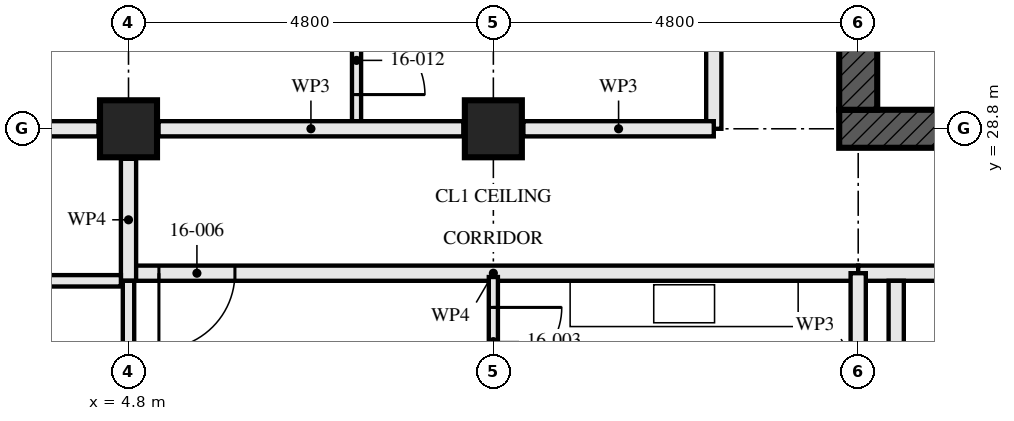
"""IFC4 building model, lengths in metres.
Left out: names, types, materials, properties, quantities, classifications, styles, units other than length and angle.
Written with IfcOpenShell. Run it as: python <this file> out.ifc"""

import sys

from ifc_helpers import new_model, si_unit, direction, frame, frame_2d, origin, origin_2d, place, context, subcontext, project, spatial, rectangle, hollow_rectangle, extrude, element, fill, save


model = new_model("IFC4")
c1 = context("Model", 3, precision=1e-05, world=origin(), true_north=direction((0.0, 1.0)))
c2 = subcontext(c1, "Body", "Model", "MODEL_VIEW")
j1 = project(units=[si_unit("LENGTHUNIT", "METRE"), si_unit("PLANEANGLEUNIT", "RADIAN")], contexts=[c1])
p1 = place(None, origin())
s1 = spatial("IfcSite", under=j1, at=p1, CompositionType="ELEMENT")
p2 = place(p1, origin())
s2 = spatial("IfcBuilding", under=s1, at=p2, CompositionType="ELEMENT")
p3 = place(p2, frame((0.0, 0.0, 62.0)))
s3 = spatial("IfcBuildingStorey", under=s2, at=p3, CompositionType="ELEMENT", Elevation=62.0)
for number, where, z_axis, x_axis in (
    (1, (4.8, 28.8, 0.0), (0.0, 0.0, 1.0), (0.0, 1.0, 0.0)),
    (2, (9.6, 28.8, 0.0), (0.0, 0.0, 1.0), (0.0, 1.0, 0.0)),
):
    element("IfcColumn", number, at=place(p3, frame(where, z_axis=z_axis, x_axis=x_axis)), inside=s3, PredefinedType="COLUMN", context=c2, shape_type="SweptSolid", body=[
        extrude(hollow_rectangle(XDim=0.75, YDim=0.75, WallThickness=0.08, at=origin_2d()), origin(), (0.0, 0.0, 1.0), 3.5),
    ])
p4 = place(p3, frame((14.15, 28.8, -0.17), z_axis=(0.0, 0.0, 1.0), x_axis=(1.0, 0.0, 0.0)))
e3 = element("IfcWall", 3, at=p4, inside=s3, PredefinedType="SHEAR", context=c2, shape_type="SweptSolid", body=[
    extrude(rectangle(XDim=14.9, YDim=0.5, at=frame_2d((7.45, 0.0))), origin(), (0.0, 0.0, 1.0), 3.5),
])
p5 = place(p4, frame((6.85, 0.0, 0.17)))
e4 = element("IfcOpeningElement", 4, at=p5, cuts=e3, PredefinedType="OPENING", context=c2, shape_type="SweptSolid", body=[
    extrude(rectangle(XDim=1.2, YDim=2.1, at=frame_2d((0.6, 1.05))), frame((0.0, 0.26, 0.0), z_axis=(0.0, -1.0, 0.0), x_axis=(1.0, 0.0, 0.0)), (0.0, 0.0, 1.0), 0.521),
])
p6 = place(p3, frame((14.4, 42.95, -0.17), z_axis=(0.0, 0.0, 1.0), x_axis=(0.0, -1.0, 0.0)))
e5 = element("IfcWall", 5, at=p6, inside=s3, PredefinedType="SHEAR", context=c2, shape_type="SweptSolid", body=[
    extrude(rectangle(XDim=13.9, YDim=0.5, at=frame_2d((6.95, 0.0))), origin(), (0.0, 0.0, 1.0), 3.5),
])
p7 = place(p6, frame((6.35, 0.0, 0.17)))
e6 = element("IfcOpeningElement", 6, at=p7, cuts=e5, PredefinedType="OPENING", context=c2, shape_type="SweptSolid", body=[
    extrude(rectangle(XDim=1.2, YDim=2.1, at=frame_2d((0.6, 1.05))), frame((0.0, 0.26, 0.0), z_axis=(0.0, -1.0, 0.0), x_axis=(1.0, 0.0, 0.0)), (0.0, 0.0, 1.0), 0.521),
])
p8 = place(p3, frame((4.8, 23.8, 0.0), z_axis=(0.0, 0.0, 1.0), x_axis=(0.0, 1.0, 0.0)))
e7 = element("IfcWall", 7, at=p8, inside=s3, PredefinedType="PARTITIONING", context=c2, shape_type="SweptSolid", body=[
    extrude(rectangle(XDim=3.0, YDim=0.15, at=frame_2d((1.5, 0.0))), origin(), (0.0, 0.0, 1.0), 2.55),
])
p9 = place(p8, frame((1.05, 0.0, 0.0)))
e8 = element("IfcOpeningElement", 8, at=p9, cuts=e7, PredefinedType="OPENING", context=c2, shape_type="SweptSolid", body=[
    extrude(rectangle(XDim=0.9, YDim=2.1, at=frame_2d((0.45, 1.05))), frame((0.0, 0.085, 0.0), z_axis=(0.0, -1.0, 0.0), x_axis=(1.0, 0.0, 0.0)), (0.0, 0.0, 1.0), 0.171),
])
p10 = place(p3, frame((9.6, 22.2, 0.0), z_axis=(0.0, 0.0, 1.0), x_axis=(0.0, 1.0, 0.0)))
e9 = element("IfcWall", 9, at=p10, inside=s3, PredefinedType="PARTITIONING", context=c2, shape_type="SweptSolid", body=[
    extrude(rectangle(XDim=4.65, YDim=0.12, at=frame_2d((2.325, 0.0))), origin(), (0.0, 0.0, 1.0), 2.55),
])
p11 = place(p10, frame((3.35, 0.0, 0.0)))
e10 = element("IfcOpeningElement", 10, at=p11, cuts=e9, PredefinedType="OPENING", context=c2, shape_type="SweptSolid", body=[
    extrude(rectangle(XDim=0.9, YDim=2.1, at=frame_2d((0.45, 1.05))), frame((0.0, 0.071, 0.0), z_axis=(0.0, -1.0, 0.0), x_axis=(1.0, 0.0, 0.0)), (0.0, 0.0, 1.0), 0.141),
])
p12 = place(p3, frame((4.8, 26.9, 0.0), z_axis=(0.0, 0.0, 1.0), x_axis=(1.0, 0.0, 0.0)))
e11 = element("IfcWall", 11, at=p12, inside=s3, PredefinedType="PARTITIONING", context=c2, shape_type="SweptSolid", body=[
    extrude(rectangle(XDim=9.6, YDim=0.2, at=frame_2d((4.8, 0.0))), origin(), (0.0, 0.0, 1.0), 3.33),
])
p13 = place(p12, frame((0.4, 0.0, 0.0)))
e12 = element("IfcOpeningElement", 12, at=p13, cuts=e11, PredefinedType="OPENING", context=c2, shape_type="SweptSolid", body=[
    extrude(rectangle(XDim=1.0, YDim=2.1, at=frame_2d((0.5, 1.05))), frame((0.0, 0.111, 0.0), z_axis=(0.0, -1.0, 0.0), x_axis=(1.0, 0.0, 0.0)), (0.0, 0.0, 1.0), 0.221),
])
p14 = place(p3, frame((4.8, 26.8, 0.0), z_axis=(0.0, 0.0, 1.0), x_axis=(0.0, 1.0, 0.0)))
e13 = element("IfcWall", 13, at=p14, inside=s3, PredefinedType="PARTITIONING", context=c2, shape_type="SweptSolid", body=[
    extrude(rectangle(XDim=1.605, YDim=0.2, at=frame_2d((0.802, 0.0))), origin(), (0.0, 0.0, 1.0), 3.33),
])
p15 = place(p3, frame((7.8, 33.6, 0.0), z_axis=(0.0, 0.0, 1.0), x_axis=(0.0, -1.0, 0.0)))
e14 = element("IfcWall", 14, at=p15, inside=s3, PredefinedType="PARTITIONING", context=c2, shape_type="SweptSolid", body=[
    extrude(rectangle(XDim=4.8, YDim=0.12, at=frame_2d((2.4, 0.0))), origin(), (0.0, 0.0, 1.0), 3.33),
])
p16 = place(p15, frame((3.45, 0.0, 0.0)))
e15 = element("IfcOpeningElement", 15, at=p16, cuts=e14, PredefinedType="OPENING", context=c2, shape_type="SweptSolid", body=[
    extrude(rectangle(XDim=0.9, YDim=2.1, at=frame_2d((0.45, 1.05))), frame((0.0, 0.071, 0.0), z_axis=(0.0, -1.0, 0.0), x_axis=(1.0, 0.0, 0.0)), (0.0, 0.0, 1.0), 0.141),
])
p17 = place(p3, frame((12.5, 43.2, 0.0), z_axis=(0.0, 0.0, 1.0), x_axis=(0.0, -1.0, 0.0)))
e16 = element("IfcWall", 16, at=p17, inside=s3, PredefinedType="PARTITIONING", context=c2, shape_type="SweptSolid", body=[
    extrude(rectangle(XDim=14.4, YDim=0.2, at=frame_2d((7.2, 0.0))), origin(), (0.0, 0.0, 1.0), 2.55),
])
p18 = place(p17, frame((1.4, 0.0, 0.0)))
e17 = element("IfcOpeningElement", 17, at=p18, cuts=e16, PredefinedType="OPENING", context=c2, shape_type="SweptSolid", body=[
    extrude(rectangle(XDim=1.0, YDim=2.1, at=frame_2d((0.5, 1.05))), frame((0.0, 0.111, 0.0), z_axis=(0.0, -1.0, 0.0), x_axis=(1.0, 0.0, 0.0)), (0.0, 0.0, 1.0), 0.221),
])
p19 = place(p17, frame((10.0, 0.0, 0.0)))
e18 = element("IfcOpeningElement", 18, at=p19, cuts=e16, PredefinedType="OPENING", context=c2, shape_type="SweptSolid", body=[
    extrude(rectangle(XDim=1.0, YDim=2.1, at=frame_2d((0.5, 1.05))), frame((0.0, 0.111, 0.0), z_axis=(0.0, -1.0, 0.0), x_axis=(1.0, 0.0, 0.0)), (0.0, 0.0, 1.0), 0.221),
])
p20 = place(p3, frame((14.9, 22.1, 0.0), z_axis=(0.0, 0.0, 1.0), x_axis=(0.0, 1.0, 0.0)))
e19 = element("IfcWall", 19, at=p20, inside=s3, PredefinedType="SOLIDWALL", context=c2, shape_type="SweptSolid", body=[
    extrude(rectangle(XDim=4.7, YDim=0.2, at=frame_2d((2.35, 0.0))), origin(), (0.0, 0.0, 1.0), 2.99),
])
p21 = place(p3, frame((14.4, 26.9, 0.0), z_axis=(0.0, 0.0, 1.0), x_axis=(1.0, 0.0, 0.0)))
e20 = element("IfcWall", 20, at=p21, inside=s3, PredefinedType="SOLIDWALL", context=c2, shape_type="SweptSolid", body=[
    extrude(rectangle(XDim=3.4, YDim=0.2, at=frame_2d((1.7, 0.0))), origin(), (0.0, 0.0, 1.0), 3.33),
])
p22 = place(p21, frame((1.4, 0.0, 0.0)))
e21 = element("IfcOpeningElement", 21, at=p22, cuts=e20, PredefinedType="OPENING", context=c2, shape_type="SweptSolid", body=[
    extrude(rectangle(XDim=1.0, YDim=2.1, at=frame_2d((0.5, 1.05))), frame((0.0, 0.111, 0.0), z_axis=(0.0, -1.0, 0.0), x_axis=(1.0, 0.0, 0.0)), (0.0, 0.0, 1.0), 0.221),
])
p23 = place(p3, frame((12.5, 28.8, 0.0), z_axis=(0.0, 0.0, 1.0), x_axis=(-1.0, 0.0, 0.0)))
e22 = element("IfcWall", 22, at=p23, inside=s3, PredefinedType="PARTITIONING", context=c2, shape_type="SweptSolid", body=[
    extrude(rectangle(XDim=2.505, YDim=0.2, at=frame_2d((1.252, 0.0))), origin(), (0.0, 0.0, 1.0), 2.32),
])
p24 = place(p3, frame((9.205, 28.8, 0.0), z_axis=(0.0, 0.0, 1.0), x_axis=(-1.0, 0.0, 0.0)))
e23 = element("IfcWall", 23, at=p24, inside=s3, PredefinedType="PARTITIONING", context=c2, shape_type="SweptSolid", body=[
    extrude(rectangle(XDim=4.01, YDim=0.2, at=frame_2d((2.005, 0.0))), origin(), (0.0, 0.0, 1.0), 2.32),
])
p25 = place(p3, frame((4.405, 28.8, 0.0), z_axis=(0.0, 0.0, 1.0), x_axis=(-1.0, 0.0, 0.0)))
e24 = element("IfcWall", 24, at=p25, inside=s3, PredefinedType="PARTITIONING", context=c2, shape_type="SweptSolid", body=[
    extrude(rectangle(XDim=4.085, YDim=0.2, at=frame_2d((2.042, 0.0))), origin(), (0.0, 0.0, 1.0), 2.32),
])
p26 = place(p3, frame((14.4, 24.395, 0.0), z_axis=(0.0, 0.0, 1.0), x_axis=(0.0, 1.0, 0.0)))
e25 = element("IfcWall", 25, at=p26, inside=s3, PredefinedType="PARTITIONING", context=c2, shape_type="SweptSolid", body=[
    extrude(rectangle(XDim=2.505, YDim=0.2, at=frame_2d((1.252, 0.0))), origin(), (0.0, 0.0, 1.0), 2.32),
])
p27 = place(p3, frame((-0.43, 26.8, 0.0), z_axis=(0.0, 0.0, 1.0), x_axis=(1.0, 0.0, 0.0)))
e26 = element("IfcWall", 26, at=p27, inside=s3, PredefinedType="PARTITIONING", context=c2, shape_type="SweptSolid", body=[
    extrude(rectangle(XDim=5.13, YDim=0.15, at=frame_2d((2.565, 0.0))), origin(), (0.0, 0.0, 1.0), 2.32),
])
p28 = place(p11, frame((0.9, 0.0, 0.0), z_axis=(0.0, 0.0, 1.0), x_axis=(-1.0, 0.0, 0.0)))
e27 = element("IfcDoor", 27, at=p28, inside=s3, OperationType="SINGLE_SWING_RIGHT", PredefinedType="DOOR", context=c2, shape_type="SweptSolid", body=[
    extrude(rectangle(XDim=0.9, YDim=2.1, at=frame_2d((0.45, 1.05))), frame((0.0, 0.022, 0.0), z_axis=(0.0, -1.0, 0.0), x_axis=(1.0, 0.0, 0.0)), (0.0, 0.0, 1.0), 0.044),
])
fill(e10, e27)
p29 = place(p13, frame((1.0, 0.0, 0.0), z_axis=(0.0, 0.0, 1.0), x_axis=(-1.0, 0.0, 0.0)))
e28 = element("IfcDoor", 28, at=p29, inside=s3, OperationType="SINGLE_SWING_LEFT", PredefinedType="DOOR", context=c2, shape_type="SweptSolid", body=[
    extrude(rectangle(XDim=1.0, YDim=2.1, at=frame_2d((0.5, 1.05))), frame((0.0, 0.027, 0.0), z_axis=(0.0, -1.0, 0.0), x_axis=(1.0, 0.0, 0.0)), (0.0, 0.0, 1.0), 0.054),
])
fill(e12, e28)
p30 = place(p16, origin())
e29 = element("IfcDoor", 29, at=p30, inside=s3, OperationType="SINGLE_SWING_LEFT", PredefinedType="DOOR", context=c2, shape_type="SweptSolid", body=[
    extrude(rectangle(XDim=0.9, YDim=2.1, at=frame_2d((0.45, 1.05))), frame((0.0, 0.022, 0.0), z_axis=(0.0, -1.0, 0.0), x_axis=(1.0, 0.0, 0.0)), (0.0, 0.0, 1.0), 0.044),
])
fill(e15, e29)
save(model, sys.argv[1])
